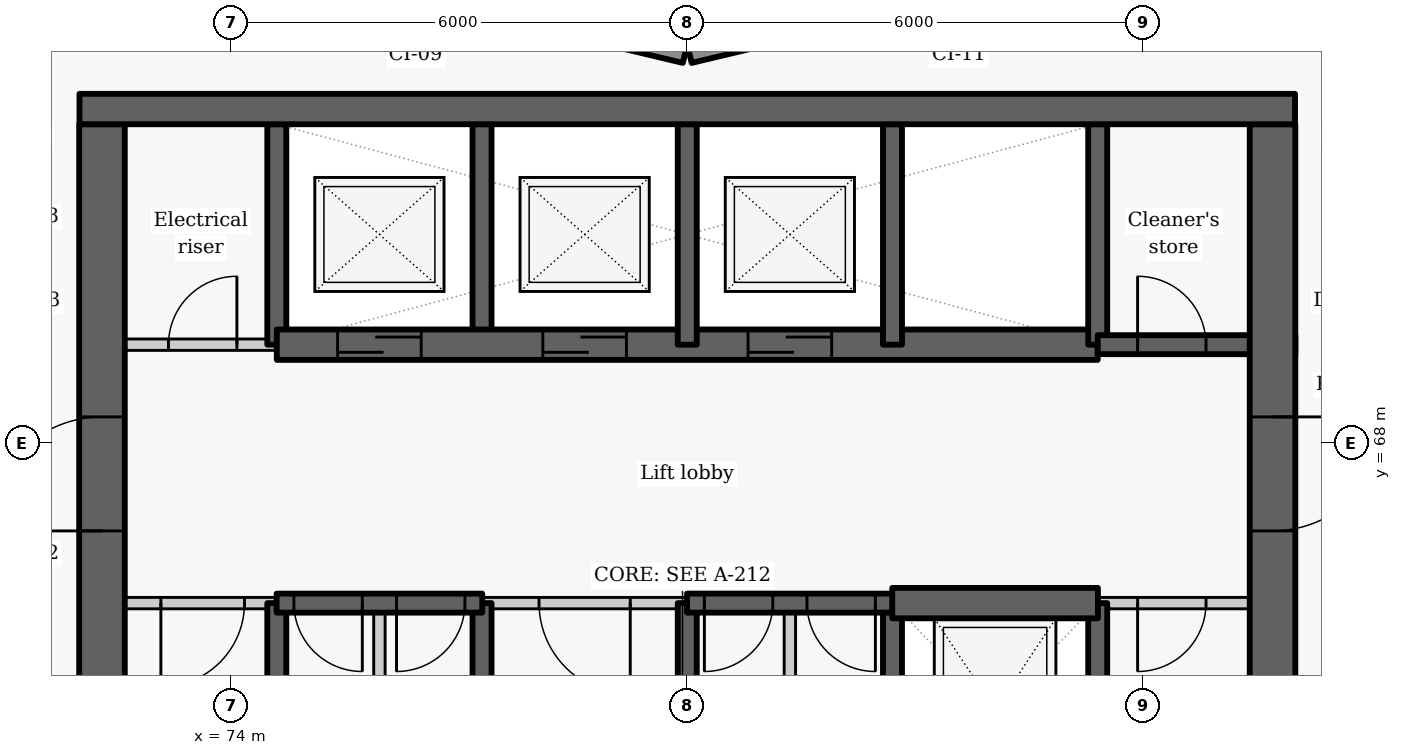
"""IFC4 building model, lengths in metres.
Left out: names, types, materials, properties, quantities, classifications, styles, units other than length and angle.
Written with IfcOpenShell. Run it as: python <this file> out.ifc"""

import sys

from ifc_helpers import new_model, si_unit, direction, frame, frame_2d, origin, place, context, subcontext, project, spatial, rectangle, extrude, element, fill, save


model = new_model("IFC4")
c1 = context("Model", 3, precision=1e-05, world=origin(), true_north=direction((0.0, 1.0)))
c2 = subcontext(c1, "Body", "Model", "MODEL_VIEW")
j1 = project(units=[si_unit("LENGTHUNIT", "METRE"), si_unit("PLANEANGLEUNIT", "RADIAN")], contexts=[c1])
p1 = place(None, origin())
s1 = spatial("IfcSite", under=j1, at=p1, CompositionType="ELEMENT")
p2 = place(p1, origin())
s2 = spatial("IfcBuilding", under=s1, at=p2, CompositionType="ELEMENT")
p3 = place(p2, frame((0.0, 0.0, 51.3)))
s3 = spatial("IfcBuildingStorey", under=s2, at=p3, CompositionType="ELEMENT", Elevation=51.3)
for number, where, z_axis, x_axis in (
    (1, (83.186, 73.881, 0.0), (0.0, 0.0, 1.0), (-0.973, -0.232, 0.0)),
    (2, (79.971, 73.128, 0.0), (0.0, 0.0, 1.0), (-0.973, 0.232, 0.0)),
):
    element("IfcWall", number, at=place(p3, frame(where, z_axis=z_axis, x_axis=x_axis)), inside=s3, PredefinedType="SOLIDWALL", context=c2, shape_type="SweptSolid", body=[
        extrude(rectangle(XDim=3.246, YDim=0.25, at=frame_2d((1.623, 0.0))), origin(), (0.0, 0.0, 1.0), 2.425),
    ])
p4 = place(p3, frame((74.6, 63.1, -0.275), z_axis=(0.0, 0.0, 1.0), x_axis=(0.0, 1.0, 0.0)))
e3 = element("IfcWall", 3, at=p4, inside=s3, PredefinedType="SHEAR", context=c2, shape_type="SweptSolid", body=[
    extrude(rectangle(XDim=2.8, YDim=0.25, at=frame_2d((1.4, 0.0))), origin(), (0.0, 0.0, 1.0), 3.3),
])
p5 = place(p3, frame((74.6, 69.3, -0.275), z_axis=(0.0, 0.0, 1.0), x_axis=(0.0, 1.0, 0.0)))
e4 = element("IfcWall", 4, at=p5, inside=s3, PredefinedType="SHEAR", context=c2, shape_type="SweptSolid", body=[
    extrude(rectangle(XDim=2.9, YDim=0.25, at=frame_2d((1.45, 0.0))), origin(), (0.0, 0.0, 1.0), 3.3),
])
p6 = place(p3, frame((72.0, 69.3, 0.0), z_axis=(0.0, 0.0, 1.0), x_axis=(1.0, 0.0, 0.0)))
e5 = element("IfcWall", 5, at=p6, inside=s3, PredefinedType="PARTITIONING", context=c2, shape_type="SweptSolid", body=[
    extrude(rectangle(XDim=2.6, YDim=0.15, at=frame_2d((1.3, 0.0))), origin(), (0.0, 0.0, 1.0), 3.025),
])
p7 = place(p6, frame((1.175, 0.0, 0.0)))
e6 = element("IfcOpeningElement", 6, at=p7, cuts=e5, PredefinedType="OPENING", context=c2, shape_type="SweptSolid", body=[
    extrude(rectangle(XDim=0.9, YDim=2.1, at=frame_2d((0.45, 1.05))), frame((0.0, 0.085, 0.0), z_axis=(0.0, -1.0, 0.0), x_axis=(1.0, 0.0, 0.0)), (0.0, 0.0, 1.0), 0.17),
])
p8 = place(p3, frame((72.3, 63.1, -0.275), z_axis=(0.0, 0.0, 1.0), x_axis=(0.0, 1.0, 0.0)))
e7 = element("IfcWall", 7, at=p8, inside=s3, PredefinedType="SHEAR", context=c2, shape_type="SweptSolid", body=[
    extrude(rectangle(XDim=9.1, YDim=0.6, at=frame_2d((4.55, 0.0))), origin(), (0.0, 0.0, 1.0), 3.3),
])
p9 = place(p8, frame((3.75, 0.0, 0.275)))
e8 = element("IfcOpeningElement", 8, at=p9, cuts=e7, PredefinedType="OPENING", context=c2, shape_type="SweptSolid", body=[
    extrude(rectangle(XDim=1.5, YDim=2.1, at=frame_2d((0.75, 1.05))), frame((0.0, 0.31, 0.0), z_axis=(0.0, -1.0, 0.0), x_axis=(1.0, 0.0, 0.0)), (0.0, 0.0, 1.0), 0.62),
])
p10 = place(p3, frame((77.3, 63.1, -0.275), z_axis=(0.0, 0.0, 1.0), x_axis=(0.0, 1.0, 0.0)))
e9 = element("IfcWall", 9, at=p10, inside=s3, PredefinedType="SHEAR", context=c2, shape_type="SweptSolid", body=[
    extrude(rectangle(XDim=2.8, YDim=0.25, at=frame_2d((1.4, 0.0))), origin(), (0.0, 0.0, 1.0), 3.3),
])
p11 = place(p3, frame((77.3, 69.3, -0.275), z_axis=(0.0, 0.0, 1.0), x_axis=(0.0, 1.0, 0.0)))
e10 = element("IfcWall", 10, at=p11, inside=s3, PredefinedType="SHEAR", context=c2, shape_type="SweptSolid", body=[
    extrude(rectangle(XDim=2.9, YDim=0.25, at=frame_2d((1.45, 0.0))), origin(), (0.0, 0.0, 1.0), 3.3),
])
p12 = place(p3, frame((74.6, 69.3, -0.275), z_axis=(0.0, 0.0, 1.0), x_axis=(1.0, 0.0, 0.0)))
e11 = element("IfcWall", 11, at=p12, inside=s3, PredefinedType="SHEAR", context=c2, shape_type="SweptSolid", body=[
    extrude(rectangle(XDim=10.8, YDim=0.4, at=frame_2d((5.4, 0.0))), origin(), (0.0, 0.0, 1.0), 3.3),
])
p13 = place(p12, frame((0.8, 0.0, 0.275)))
e12 = element("IfcOpeningElement", 12, at=p13, cuts=e11, PredefinedType="OPENING", context=c2, shape_type="SweptSolid", body=[
    extrude(rectangle(XDim=1.1, YDim=2.1, at=frame_2d((0.55, 1.05))), frame((0.0, 0.21, 0.0), z_axis=(0.0, -1.0, 0.0), x_axis=(1.0, 0.0, 0.0)), (0.0, 0.0, 1.0), 0.42),
])
p14 = place(p12, frame((3.5, 0.0, 0.275)))
e13 = element("IfcOpeningElement", 13, at=p14, cuts=e11, PredefinedType="OPENING", context=c2, shape_type="SweptSolid", body=[
    extrude(rectangle(XDim=1.1, YDim=2.1, at=frame_2d((0.55, 1.05))), frame((0.0, 0.21, 0.0), z_axis=(0.0, -1.0, 0.0), x_axis=(1.0, 0.0, 0.0)), (0.0, 0.0, 1.0), 0.42),
])
p15 = place(p12, frame((6.2, 0.0, 0.275)))
e14 = element("IfcOpeningElement", 14, at=p15, cuts=e11, PredefinedType="OPENING", context=c2, shape_type="SweptSolid", body=[
    extrude(rectangle(XDim=1.1, YDim=2.1, at=frame_2d((0.55, 1.05))), frame((0.0, 0.21, 0.0), z_axis=(0.0, -1.0, 0.0), x_axis=(1.0, 0.0, 0.0)), (0.0, 0.0, 1.0), 0.42),
])
p16 = place(p3, frame((80.0, 63.1, -0.275), z_axis=(0.0, 0.0, 1.0), x_axis=(0.0, 1.0, 0.0)))
e15 = element("IfcWall", 15, at=p16, inside=s3, PredefinedType="SHEAR", context=c2, shape_type="SweptSolid", body=[
    extrude(rectangle(XDim=2.8, YDim=0.25, at=frame_2d((1.4, 0.0))), origin(), (0.0, 0.0, 1.0), 3.3),
])
p17 = place(p3, frame((80.0, 69.3, -0.275), z_axis=(0.0, 0.0, 1.0), x_axis=(0.0, 1.0, 0.0)))
e16 = element("IfcWall", 16, at=p17, inside=s3, PredefinedType="SHEAR", context=c2, shape_type="SweptSolid", body=[
    extrude(rectangle(XDim=2.9, YDim=0.25, at=frame_2d((1.45, 0.0))), origin(), (0.0, 0.0, 1.0), 3.3),
])
p18 = place(p3, frame((82.7, 63.1, -0.275), z_axis=(0.0, 0.0, 1.0), x_axis=(0.0, 1.0, 0.0)))
e17 = element("IfcWall", 17, at=p18, inside=s3, PredefinedType="SHEAR", context=c2, shape_type="SweptSolid", body=[
    extrude(rectangle(XDim=2.8, YDim=0.25, at=frame_2d((1.4, 0.0))), origin(), (0.0, 0.0, 1.0), 3.3),
])
p19 = place(p3, frame((82.7, 69.3, -0.275), z_axis=(0.0, 0.0, 1.0), x_axis=(0.0, 1.0, 0.0)))
e18 = element("IfcWall", 18, at=p19, inside=s3, PredefinedType="SHEAR", context=c2, shape_type="SweptSolid", body=[
    extrude(rectangle(XDim=2.9, YDim=0.25, at=frame_2d((1.45, 0.0))), origin(), (0.0, 0.0, 1.0), 3.3),
])
p20 = place(p3, frame((85.4, 63.1, -0.275), z_axis=(0.0, 0.0, 1.0), x_axis=(0.0, 1.0, 0.0)))
e19 = element("IfcWall", 19, at=p20, inside=s3, PredefinedType="SHEAR", context=c2, shape_type="SweptSolid", body=[
    extrude(rectangle(XDim=2.8, YDim=0.25, at=frame_2d((1.4, 0.0))), origin(), (0.0, 0.0, 1.0), 3.3),
])
p21 = place(p3, frame((85.4, 69.3, -0.275), z_axis=(0.0, 0.0, 1.0), x_axis=(0.0, 1.0, 0.0)))
e20 = element("IfcWall", 20, at=p21, inside=s3, PredefinedType="SHEAR", context=c2, shape_type="SweptSolid", body=[
    extrude(rectangle(XDim=2.9, YDim=0.25, at=frame_2d((1.45, 0.0))), origin(), (0.0, 0.0, 1.0), 3.3),
])
p22 = place(p3, frame((85.4, 69.3, -0.275), z_axis=(0.0, 0.0, 1.0), x_axis=(1.0, 0.0, 0.0)))
e21 = element("IfcWall", 21, at=p22, inside=s3, PredefinedType="SHEAR", context=c2, shape_type="SweptSolid", body=[
    extrude(rectangle(XDim=2.6, YDim=0.25, at=frame_2d((1.3, 0.0))), origin(), (0.0, 0.0, 1.0), 3.3),
])
p23 = place(p22, frame((0.525, 0.0, 0.275)))
e22 = element("IfcOpeningElement", 22, at=p23, cuts=e21, PredefinedType="OPENING", context=c2, shape_type="SweptSolid", body=[
    extrude(rectangle(XDim=0.9, YDim=2.1, at=frame_2d((0.45, 1.05))), frame((0.0, 0.135, 0.0), z_axis=(0.0, -1.0, 0.0), x_axis=(1.0, 0.0, 0.0)), (0.0, 0.0, 1.0), 0.27),
])
p24 = place(p3, frame((87.7, 72.2, -0.275), z_axis=(0.0, 0.0, 1.0), x_axis=(0.0, -1.0, 0.0)))
e23 = element("IfcWall", 23, at=p24, inside=s3, PredefinedType="SHEAR", context=c2, shape_type="SweptSolid", body=[
    extrude(rectangle(XDim=15.6, YDim=0.6, at=frame_2d((7.8, 0.0))), origin(), (0.0, 0.0, 1.0), 3.3),
])
p25 = place(p24, frame((3.85, 0.0, 0.275)))
e24 = element("IfcOpeningElement", 24, at=p25, cuts=e23, PredefinedType="OPENING", context=c2, shape_type="SweptSolid", body=[
    extrude(rectangle(XDim=1.5, YDim=2.1, at=frame_2d((0.75, 1.05))), frame((0.0, 0.31, 0.0), z_axis=(0.0, -1.0, 0.0), x_axis=(1.0, 0.0, 0.0)), (0.0, 0.0, 1.0), 0.62),
])
p26 = place(p24, frame((11.8, 0.0, 0.275)))
e25 = element("IfcOpeningElement", 25, at=p26, cuts=e23, PredefinedType="OPENING", context=c2, shape_type="SweptSolid", body=[
    extrude(rectangle(XDim=1.1, YDim=2.1, at=frame_2d((0.55, 1.05))), frame((0.0, 0.31, 0.0), z_axis=(0.0, -1.0, 0.0), x_axis=(1.0, 0.0, 0.0)), (0.0, 0.0, 1.0), 0.62),
])
p27 = place(p3, frame((74.603, 65.9, 0.0), z_axis=(0.0, 0.0, 1.0), x_axis=(-1.0, 0.0, 0.0)))
e26 = element("IfcWall", 26, at=p27, inside=s3, PredefinedType="PARTITIONING", context=c2, shape_type="SweptSolid", body=[
    extrude(rectangle(XDim=2.603, YDim=0.15, at=frame_2d((1.302, 0.0))), origin(), (0.0, 0.0, 1.0), 3.025),
])
p28 = place(p27, frame((0.428, 0.0, 0.0)))
e27 = element("IfcOpeningElement", 27, at=p28, cuts=e26, PredefinedType="OPENING", context=c2, shape_type="SweptSolid", body=[
    extrude(rectangle(XDim=1.1, YDim=2.1, at=frame_2d((0.55, 1.05))), frame((0.0, 0.085, 0.0), z_axis=(0.0, -1.0, 0.0), x_axis=(1.0, 0.0, 0.0)), (0.0, 0.0, 1.0), 0.17),
])
p29 = place(p3, frame((80.003, 65.9, 0.0), z_axis=(0.0, 0.0, 1.0), x_axis=(-1.0, 0.0, 0.0)))
e28 = element("IfcWall", 28, at=p29, inside=s3, PredefinedType="PARTITIONING", context=c2, shape_type="SweptSolid", body=[
    extrude(rectangle(XDim=2.706, YDim=0.15, at=frame_2d((1.353, 0.0))), origin(), (0.0, 0.0, 1.0), 3.025),
])
p30 = place(p29, frame((0.753, 0.0, 0.0)))
e29 = element("IfcOpeningElement", 29, at=p30, cuts=e28, PredefinedType="OPENING", context=c2, shape_type="SweptSolid", body=[
    extrude(rectangle(XDim=1.2, YDim=2.1, at=frame_2d((0.6, 1.05))), frame((0.0, 0.085, 0.0), z_axis=(0.0, -1.0, 0.0), x_axis=(1.0, 0.0, 0.0)), (0.0, 0.0, 1.0), 0.17),
])
p31 = place(p3, frame((88.0, 65.9, 0.0), z_axis=(0.0, 0.0, 1.0), x_axis=(-1.0, 0.0, 0.0)))
e30 = element("IfcWall", 30, at=p31, inside=s3, PredefinedType="PARTITIONING", context=c2, shape_type="SweptSolid", body=[
    extrude(rectangle(XDim=2.603, YDim=0.15, at=frame_2d((1.302, 0.0))), origin(), (0.0, 0.0, 1.0), 3.025),
])
p32 = place(p31, frame((1.175, 0.0, 0.0)))
e31 = element("IfcOpeningElement", 31, at=p32, cuts=e30, PredefinedType="OPENING", context=c2, shape_type="SweptSolid", body=[
    extrude(rectangle(XDim=0.9, YDim=2.1, at=frame_2d((0.45, 1.05))), frame((0.0, 0.085, 0.0), z_axis=(0.0, -1.0, 0.0), x_axis=(1.0, 0.0, 0.0)), (0.0, 0.0, 1.0), 0.17),
])
p33 = place(p3, frame((77.303, 65.9, -0.275), z_axis=(0.0, 0.0, 1.0), x_axis=(-1.0, 0.0, 0.0)))
e32 = element("IfcWall", 32, at=p33, inside=s3, PredefinedType="SHEAR", context=c2, shape_type="SweptSolid", body=[
    extrude(rectangle(XDim=2.706, YDim=0.25, at=frame_2d((1.353, 0.0))), origin(), (0.0, 0.0, 1.0), 3.3),
])
p34 = place(p33, frame((1.578, 0.0, 0.275)))
e33 = element("IfcOpeningElement", 33, at=p34, cuts=e32, PredefinedType="OPENING", context=c2, shape_type="SweptSolid", body=[
    extrude(rectangle(XDim=0.9, YDim=2.1, at=frame_2d((0.45, 1.05))), frame((0.0, 0.135, 0.0), z_axis=(0.0, -1.0, 0.0), x_axis=(1.0, 0.0, 0.0)), (0.0, 0.0, 1.0), 0.27),
])
p35 = place(p33, frame((0.228, 0.0, 0.275)))
e34 = element("IfcOpeningElement", 34, at=p35, cuts=e32, PredefinedType="OPENING", context=c2, shape_type="SweptSolid", body=[
    extrude(rectangle(XDim=0.9, YDim=2.1, at=frame_2d((0.45, 1.05))), frame((0.0, 0.135, 0.0), z_axis=(0.0, -1.0, 0.0), x_axis=(1.0, 0.0, 0.0)), (0.0, 0.0, 1.0), 0.27),
])
p36 = place(p3, frame((82.703, 65.9, -0.275), z_axis=(0.0, 0.0, 1.0), x_axis=(-1.0, 0.0, 0.0)))
e35 = element("IfcWall", 35, at=p36, inside=s3, PredefinedType="SHEAR", context=c2, shape_type="SweptSolid", body=[
    extrude(rectangle(XDim=2.706, YDim=0.25, at=frame_2d((1.353, 0.0))), origin(), (0.0, 0.0, 1.0), 3.3),
])
p37 = place(p36, frame((1.578, 0.0, 0.275)))
e36 = element("IfcOpeningElement", 36, at=p37, cuts=e35, PredefinedType="OPENING", context=c2, shape_type="SweptSolid", body=[
    extrude(rectangle(XDim=0.9, YDim=2.1, at=frame_2d((0.45, 1.05))), frame((0.0, 0.135, 0.0), z_axis=(0.0, -1.0, 0.0), x_axis=(1.0, 0.0, 0.0)), (0.0, 0.0, 1.0), 0.27),
])
p38 = place(p36, frame((0.228, 0.0, 0.275)))
e37 = element("IfcOpeningElement", 37, at=p38, cuts=e35, PredefinedType="OPENING", context=c2, shape_type="SweptSolid", body=[
    extrude(rectangle(XDim=0.9, YDim=2.1, at=frame_2d((0.45, 1.05))), frame((0.0, 0.135, 0.0), z_axis=(0.0, -1.0, 0.0), x_axis=(1.0, 0.0, 0.0)), (0.0, 0.0, 1.0), 0.27),
])
p39 = place(p3, frame((82.697, 65.9, -0.275), z_axis=(0.0, 0.0, 1.0), x_axis=(1.0, 0.0, 0.0)))
e38 = element("IfcWall", 38, at=p39, inside=s3, PredefinedType="SHEAR", context=c2, shape_type="SweptSolid", body=[
    extrude(rectangle(XDim=2.706, YDim=0.4, at=frame_2d((1.353, 0.0))), origin(), (0.0, 0.0, 1.0), 3.3),
])
for number, where, z_axis, x_axis in (
    (39, (75.95, 63.1, 0.0), (0.0, 0.0, 1.0), (0.0, 1.0, 0.0)),
    (40, (81.35, 63.1, 0.0), (0.0, 0.0, 1.0), (0.0, 1.0, 0.0)),
):
    element("IfcWall", number, at=place(p3, frame(where, z_axis=z_axis, x_axis=x_axis)), inside=s3, PredefinedType="PARTITIONING", context=c2, shape_type="SweptSolid", body=[
        extrude(rectangle(XDim=2.8, YDim=0.15, at=frame_2d((1.4, 0.0))), origin(), (0.0, 0.0, 1.0), 3.025),
    ])
p40 = place(p3, frame((72.004, 72.4, -0.275), z_axis=(0.0, 0.0, 1.0), x_axis=(1.0, 0.0, 0.0)))
e41 = element("IfcWall", 41, at=p40, inside=s3, PredefinedType="SHEAR", context=c2, shape_type="SweptSolid", body=[
    extrude(rectangle(XDim=15.992, YDim=0.4, at=frame_2d((7.996, 0.0))), origin(), (0.0, 0.0, 1.0), 3.3),
])
p41 = place(p7, origin())
e42 = element("IfcDoor", 42, at=p41, inside=s3, OperationType="SINGLE_SWING_RIGHT", PredefinedType="DOOR", context=c2, shape_type="SweptSolid", body=[
    extrude(rectangle(XDim=0.9, YDim=2.1, at=frame_2d((0.45, 1.05))), frame((0.0, 0.025, 0.0), z_axis=(0.0, -1.0, 0.0), x_axis=(1.0, 0.0, 0.0)), (0.0, 0.0, 1.0), 0.05),
])
fill(e6, e42)
p42 = place(p13, origin())
e43 = element("IfcDoor", 43, at=p42, inside=s3, OperationType="SLIDING_TO_LEFT", PredefinedType="DOOR", context=c2, shape_type="SweptSolid", body=[
    extrude(rectangle(XDim=1.1, YDim=2.1, at=frame_2d((0.55, 1.05))), frame((0.0, 0.025, 0.0), z_axis=(0.0, -1.0, 0.0), x_axis=(1.0, 0.0, 0.0)), (0.0, 0.0, 1.0), 0.05),
])
fill(e12, e43)
p43 = place(p14, origin())
e44 = element("IfcDoor", 44, at=p43, inside=s3, OperationType="SLIDING_TO_LEFT", PredefinedType="DOOR", context=c2, shape_type="SweptSolid", body=[
    extrude(rectangle(XDim=1.1, YDim=2.1, at=frame_2d((0.55, 1.05))), frame((0.0, 0.025, 0.0), z_axis=(0.0, -1.0, 0.0), x_axis=(1.0, 0.0, 0.0)), (0.0, 0.0, 1.0), 0.05),
])
fill(e13, e44)
p44 = place(p15, origin())
e45 = element("IfcDoor", 45, at=p44, inside=s3, OperationType="SLIDING_TO_LEFT", PredefinedType="DOOR", context=c2, shape_type="SweptSolid", body=[
    extrude(rectangle(XDim=1.1, YDim=2.1, at=frame_2d((0.55, 1.05))), frame((0.0, 0.025, 0.0), z_axis=(0.0, -1.0, 0.0), x_axis=(1.0, 0.0, 0.0)), (0.0, 0.0, 1.0), 0.05),
])
fill(e14, e45)
p45 = place(p23, origin())
e46 = element("IfcDoor", 46, at=p45, inside=s3, OperationType="SINGLE_SWING_LEFT", PredefinedType="DOOR", context=c2, shape_type="SweptSolid", body=[
    extrude(rectangle(XDim=0.9, YDim=2.1, at=frame_2d((0.45, 1.05))), frame((0.0, 0.025, 0.0), z_axis=(0.0, -1.0, 0.0), x_axis=(1.0, 0.0, 0.0)), (0.0, 0.0, 1.0), 0.05),
])
fill(e22, e46)
p46 = place(p28, origin())
e47 = element("IfcDoor", 47, at=p46, inside=s3, OperationType="SINGLE_SWING_RIGHT", PredefinedType="DOOR", context=c2, shape_type="SweptSolid", body=[
    extrude(rectangle(XDim=1.1, YDim=2.1, at=frame_2d((0.55, 1.05))), frame((0.0, 0.025, 0.0), z_axis=(0.0, -1.0, 0.0), x_axis=(1.0, 0.0, 0.0)), (0.0, 0.0, 1.0), 0.05),
])
fill(e27, e47)
p47 = place(p34, origin())
e48 = element("IfcDoor", 48, at=p47, inside=s3, OperationType="SINGLE_SWING_LEFT", PredefinedType="DOOR", context=c2, shape_type="SweptSolid", body=[
    extrude(rectangle(XDim=0.9, YDim=2.1, at=frame_2d((0.45, 1.05))), frame((0.0, 0.025, 0.0), z_axis=(0.0, -1.0, 0.0), x_axis=(1.0, 0.0, 0.0)), (0.0, 0.0, 1.0), 0.05),
])
fill(e33, e48)
p48 = place(p35, origin())
e49 = element("IfcDoor", 49, at=p48, inside=s3, OperationType="SINGLE_SWING_RIGHT", PredefinedType="DOOR", context=c2, shape_type="SweptSolid", body=[
    extrude(rectangle(XDim=0.9, YDim=2.1, at=frame_2d((0.45, 1.05))), frame((0.0, 0.025, 0.0), z_axis=(0.0, -1.0, 0.0), x_axis=(1.0, 0.0, 0.0)), (0.0, 0.0, 1.0), 0.05),
])
fill(e34, e49)
p49 = place(p30, origin())
e50 = element("IfcDoor", 50, at=p49, inside=s3, OperationType="DOUBLE_DOOR_SINGLE_SWING", PredefinedType="DOOR", context=c2, shape_type="SweptSolid", body=[
    extrude(rectangle(XDim=1.2, YDim=2.1, at=frame_2d((0.6, 1.05))), frame((0.0, 0.025, 0.0), z_axis=(0.0, -1.0, 0.0), x_axis=(1.0, 0.0, 0.0)), (0.0, 0.0, 1.0), 0.05),
])
fill(e29, e50)
p50 = place(p37, origin())
e51 = element("IfcDoor", 51, at=p50, inside=s3, OperationType="SINGLE_SWING_RIGHT", PredefinedType="DOOR", context=c2, shape_type="SweptSolid", body=[
    extrude(rectangle(XDim=0.9, YDim=2.1, at=frame_2d((0.45, 1.05))), frame((0.0, 0.025, 0.0), z_axis=(0.0, -1.0, 0.0), x_axis=(1.0, 0.0, 0.0)), (0.0, 0.0, 1.0), 0.05),
])
fill(e36, e51)
p51 = place(p38, origin())
e52 = element("IfcDoor", 52, at=p51, inside=s3, OperationType="SINGLE_SWING_LEFT", PredefinedType="DOOR", context=c2, shape_type="SweptSolid", body=[
    extrude(rectangle(XDim=0.9, YDim=2.1, at=frame_2d((0.45, 1.05))), frame((0.0, 0.025, 0.0), z_axis=(0.0, -1.0, 0.0), x_axis=(1.0, 0.0, 0.0)), (0.0, 0.0, 1.0), 0.05),
])
fill(e37, e52)
p52 = place(p32, origin())
e53 = element("IfcDoor", 53, at=p52, inside=s3, OperationType="SINGLE_SWING_RIGHT", PredefinedType="DOOR", context=c2, shape_type="SweptSolid", body=[
    extrude(rectangle(XDim=0.9, YDim=2.1, at=frame_2d((0.45, 1.05))), frame((0.0, 0.025, 0.0), z_axis=(0.0, -1.0, 0.0), x_axis=(1.0, 0.0, 0.0)), (0.0, 0.0, 1.0), 0.05),
])
fill(e31, e53)
p53 = place(p25, origin())
e54 = element("IfcDoor", 54, at=p53, inside=s3, OperationType="DOUBLE_DOOR_SINGLE_SWING", PredefinedType="DOOR", context=c2, shape_type="SweptSolid", body=[
    extrude(rectangle(XDim=1.5, YDim=2.1, at=frame_2d((0.75, 1.05))), frame((0.0, 0.025, 0.0), z_axis=(0.0, -1.0, 0.0), x_axis=(1.0, 0.0, 0.0)), (0.0, 0.0, 1.0), 0.05),
])
fill(e24, e54)
p54 = place(p9, origin())
e55 = element("IfcDoor", 55, at=p54, inside=s3, OperationType="DOUBLE_DOOR_SINGLE_SWING", PredefinedType="DOOR", context=c2, shape_type="SweptSolid", body=[
    extrude(rectangle(XDim=1.5, YDim=2.1, at=frame_2d((0.75, 1.05))), frame((0.0, 0.025, 0.0), z_axis=(0.0, -1.0, 0.0), x_axis=(1.0, 0.0, 0.0)), (0.0, 0.0, 1.0), 0.05),
])
fill(e8, e55)
save(model, sys.argv[1])
